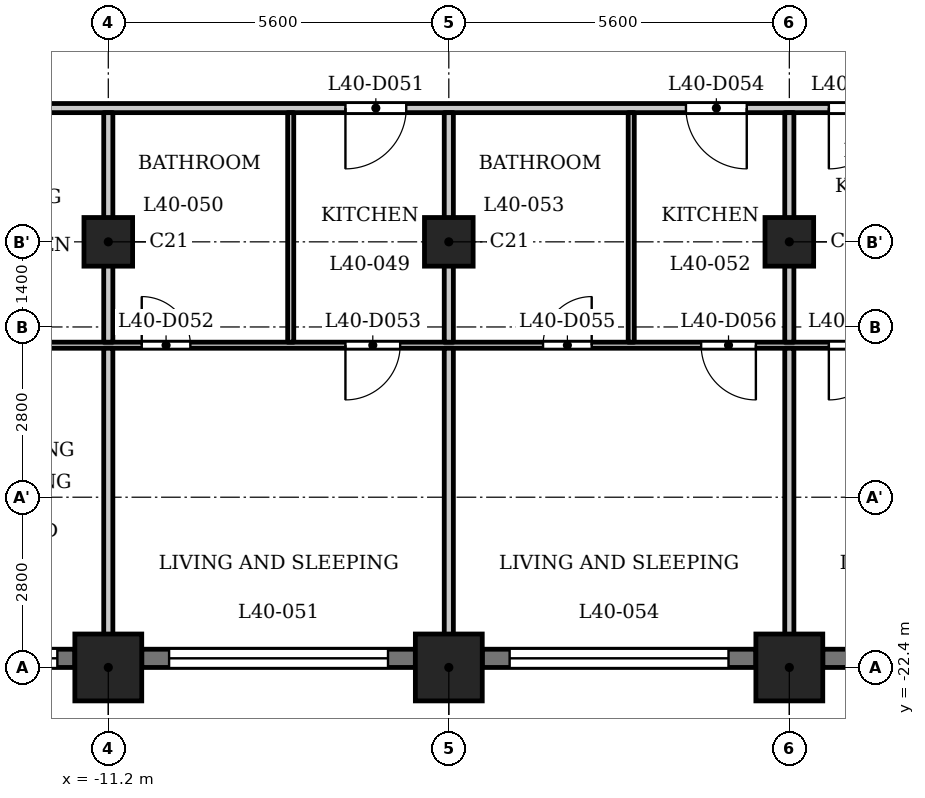
"""IFC4 building model, lengths in metres.
Left out: names, types, materials, properties, quantities, classifications, styles, units other than length and angle.
Written with IfcOpenShell. Run it as: python <this file> out.ifc"""

import sys

from ifc_helpers import new_model, si_unit, direction, frame, frame_2d, origin, origin_2d, place, context, subcontext, project, spatial, rectangle, extrude, element, fill, save


model = new_model("IFC4")
c1 = context("Model", 3, precision=1e-05, world=origin(), true_north=direction((0.0, 1.0)))
c2 = subcontext(c1, "Body", "Model", "MODEL_VIEW")
j1 = project(units=[si_unit("LENGTHUNIT", "METRE"), si_unit("PLANEANGLEUNIT", "RADIAN")], contexts=[c1])
p1 = place(None, origin())
s1 = spatial("IfcSite", under=j1, at=p1, CompositionType="ELEMENT")
p2 = place(p1, origin())
s2 = spatial("IfcBuilding", under=s1, at=p2, CompositionType="ELEMENT")
p3 = place(p2, frame((0.0, 0.0, 157.1)))
s3 = spatial("IfcBuildingStorey", under=s2, at=p3, CompositionType="ELEMENT", Elevation=157.1)
for number, where, z_axis, x_axis in (
    (1, (-11.2, -22.4, 0.0), (0.0, 0.0, 1.0), (1.0, 0.0, 0.0)),
    (2, (-5.6, -22.4, 0.0), (0.0, 0.0, 1.0), (1.0, 0.0, 0.0)),
    (3, (0.0, -22.4, 0.0), (0.0, 0.0, 1.0), (1.0, 0.0, 0.0)),
):
    element("IfcColumn", number, at=place(p3, frame(where, z_axis=z_axis, x_axis=x_axis)), inside=s3, PredefinedType="COLUMN", context=c2, shape_type="SweptSolid", body=[
        extrude(rectangle(XDim=1.1, YDim=1.1, at=origin_2d()), origin(), (0.0, 0.0, 1.0), 3.5),
    ])
for number, where, z_axis, x_axis in (
    (4, (-11.2, -15.4, 0.0), (0.0, 0.0, 1.0), (1.0, 0.0, 0.0)),
    (5, (-5.6, -15.4, 0.0), (0.0, 0.0, 1.0), (1.0, 0.0, 0.0)),
    (6, (0.0, -15.4, 0.0), (0.0, 0.0, 1.0), (1.0, 0.0, 0.0)),
):
    element("IfcColumn", number, at=place(p3, frame(where, z_axis=z_axis, x_axis=x_axis)), inside=s3, PredefinedType="COLUMN", context=c2, shape_type="SweptSolid", body=[
        extrude(rectangle(XDim=0.8, YDim=0.8, at=origin_2d()), origin(), (0.0, 0.0, 1.0), 3.5),
    ])
p4 = place(p3, frame((-16.25, -22.25, 0.0), z_axis=(0.0, 0.0, 1.0), x_axis=(1.0, 0.0, 0.0)))
e7 = element("IfcWall", 7, at=p4, inside=s3, PredefinedType="SOLIDWALL", context=c2, shape_type="SweptSolid", body=[
    extrude(rectangle(XDim=4.5, YDim=0.3, at=frame_2d((2.25, 0.0))), origin(), (0.0, 0.0, 1.0), 2.45),
])
p5 = place(p4, frame((0.387, 0.0, 0.6)))
e8 = element("IfcOpeningElement", 8, at=p5, cuts=e7, PredefinedType="OPENING", context=c2, shape_type="SweptSolid", body=[
    extrude(rectangle(XDim=1.2, YDim=1.55, at=frame_2d((0.6, 0.775))), frame((0.0, 0.16, 0.0), z_axis=(0.0, -1.0, 0.0), x_axis=(1.0, 0.0, 0.0)), (0.0, 0.0, 1.0), 0.32),
])
p6 = place(p4, frame((2.413, 0.0, 0.9)))
e9 = element("IfcOpeningElement", 9, at=p6, cuts=e7, PredefinedType="OPENING", context=c2, shape_type="SweptSolid", body=[
    extrude(rectangle(XDim=1.8, YDim=1.25, at=frame_2d((0.9, 0.625))), frame((0.0, 0.16, 0.0), z_axis=(0.0, -1.0, 0.0), x_axis=(1.0, 0.0, 0.0)), (0.0, 0.0, 1.0), 0.32),
])
p7 = place(p3, frame((-10.65, -22.25, 0.0), z_axis=(0.0, 0.0, 1.0), x_axis=(1.0, 0.0, 0.0)))
e10 = element("IfcWall", 10, at=p7, inside=s3, PredefinedType="SOLIDWALL", context=c2, shape_type="SweptSolid", body=[
    extrude(rectangle(XDim=4.5, YDim=0.3, at=frame_2d((2.25, 0.0))), origin(), (0.0, 0.0, 1.0), 2.45),
])
p8 = place(p7, frame((0.45, 0.0, 1.2)))
e11 = element("IfcOpeningElement", 11, at=p8, cuts=e10, PredefinedType="OPENING", context=c2, shape_type="SweptSolid", body=[
    extrude(rectangle(XDim=3.6, YDim=0.95, at=frame_2d((1.8, 0.475))), frame((0.0, 0.16, 0.0), z_axis=(0.0, -1.0, 0.0), x_axis=(1.0, 0.0, 0.0)), (0.0, 0.0, 1.0), 0.32),
])
p9 = place(p3, frame((-5.05, -22.25, 0.0), z_axis=(0.0, 0.0, 1.0), x_axis=(1.0, 0.0, 0.0)))
e12 = element("IfcWall", 12, at=p9, inside=s3, PredefinedType="SOLIDWALL", context=c2, shape_type="SweptSolid", body=[
    extrude(rectangle(XDim=4.5, YDim=0.3, at=frame_2d((2.25, 0.0))), origin(), (0.0, 0.0, 1.0), 2.45),
])
p10 = place(p9, frame((0.45, 0.0, 1.2)))
e13 = element("IfcOpeningElement", 13, at=p10, cuts=e12, PredefinedType="OPENING", context=c2, shape_type="SweptSolid", body=[
    extrude(rectangle(XDim=3.6, YDim=0.95, at=frame_2d((1.8, 0.475))), frame((0.0, 0.16, 0.0), z_axis=(0.0, -1.0, 0.0), x_axis=(1.0, 0.0, 0.0)), (0.0, 0.0, 1.0), 0.32),
])
p11 = place(p3, frame((0.55, -22.25, 0.0), z_axis=(0.0, 0.0, 1.0), x_axis=(1.0, 0.0, 0.0)))
e14 = element("IfcWall", 14, at=p11, inside=s3, PredefinedType="SOLIDWALL", context=c2, shape_type="SweptSolid", body=[
    extrude(rectangle(XDim=4.5, YDim=0.3, at=frame_2d((2.25, 0.0))), origin(), (0.0, 0.0, 1.0), 2.45),
])
p12 = place(p11, frame((0.45, 0.0, 1.2)))
e15 = element("IfcOpeningElement", 15, at=p12, cuts=e14, PredefinedType="OPENING", context=c2, shape_type="SweptSolid", body=[
    extrude(rectangle(XDim=3.6, YDim=0.95, at=frame_2d((1.8, 0.475))), frame((0.0, 0.16, 0.0), z_axis=(0.0, -1.0, 0.0), x_axis=(1.0, 0.0, 0.0)), (0.0, 0.0, 1.0), 0.32),
])
p13 = place(p3, frame((-16.725, -17.1, 0.0), z_axis=(0.0, 0.0, 1.0), x_axis=(1.0, 0.0, 0.0)))
e16 = element("IfcWall", 16, at=p13, inside=s3, PredefinedType="PARTITIONING", context=c2, shape_type="SweptSolid", body=[
    extrude(rectangle(XDim=33.45, YDim=0.1, at=frame_2d((16.725, 0.0))), origin(), (0.0, 0.0, 1.0), 3.2),
])
p14 = place(p13, frame((0.725, 0.0, 0.0)))
e17 = element("IfcOpeningElement", 17, at=p14, cuts=e16, PredefinedType="OPENING", context=c2, shape_type="SweptSolid", body=[
    extrude(rectangle(XDim=0.8, YDim=2.1, at=frame_2d((0.4, 1.05))), frame((0.0, 0.06, 0.0), z_axis=(0.0, -1.0, 0.0), x_axis=(1.0, 0.0, 0.0)), (0.0, 0.0, 1.0), 0.12),
])
p15 = place(p13, frame((3.175, 0.0, 0.0)))
e18 = element("IfcOpeningElement", 18, at=p15, cuts=e16, PredefinedType="OPENING", context=c2, shape_type="SweptSolid", body=[
    extrude(rectangle(XDim=0.9, YDim=2.1, at=frame_2d((0.45, 1.05))), frame((0.0, 0.06, 0.0), z_axis=(0.0, -1.0, 0.0), x_axis=(1.0, 0.0, 0.0)), (0.0, 0.0, 1.0), 0.12),
])
p16 = place(p13, frame((6.075, 0.0, 0.0)))
e19 = element("IfcOpeningElement", 19, at=p16, cuts=e16, PredefinedType="OPENING", context=c2, shape_type="SweptSolid", body=[
    extrude(rectangle(XDim=0.8, YDim=2.1, at=frame_2d((0.4, 1.05))), frame((0.0, 0.06, 0.0), z_axis=(0.0, -1.0, 0.0), x_axis=(1.0, 0.0, 0.0)), (0.0, 0.0, 1.0), 0.12),
])
p17 = place(p13, frame((9.425, 0.0, 0.0)))
e20 = element("IfcOpeningElement", 20, at=p17, cuts=e16, PredefinedType="OPENING", context=c2, shape_type="SweptSolid", body=[
    extrude(rectangle(XDim=0.9, YDim=2.1, at=frame_2d((0.45, 1.05))), frame((0.0, 0.06, 0.0), z_axis=(0.0, -1.0, 0.0), x_axis=(1.0, 0.0, 0.0)), (0.0, 0.0, 1.0), 0.12),
])
p18 = place(p13, frame((12.675, 0.0, 0.0)))
e21 = element("IfcOpeningElement", 21, at=p18, cuts=e16, PredefinedType="OPENING", context=c2, shape_type="SweptSolid", body=[
    extrude(rectangle(XDim=0.8, YDim=2.1, at=frame_2d((0.4, 1.05))), frame((0.0, 0.06, 0.0), z_axis=(0.0, -1.0, 0.0), x_axis=(1.0, 0.0, 0.0)), (0.0, 0.0, 1.0), 0.12),
])
p19 = place(p13, frame((15.275, 0.0, 0.0)))
e22 = element("IfcOpeningElement", 22, at=p19, cuts=e16, PredefinedType="OPENING", context=c2, shape_type="SweptSolid", body=[
    extrude(rectangle(XDim=0.9, YDim=2.1, at=frame_2d((0.45, 1.05))), frame((0.0, 0.06, 0.0), z_axis=(0.0, -1.0, 0.0), x_axis=(1.0, 0.0, 0.0)), (0.0, 0.0, 1.0), 0.12),
])
p20 = place(p13, frame((20.625, 0.0, 0.0)))
e23 = element("IfcOpeningElement", 23, at=p20, cuts=e16, PredefinedType="OPENING", context=c2, shape_type="SweptSolid", body=[
    extrude(rectangle(XDim=0.8, YDim=2.1, at=frame_2d((0.4, 1.05))), frame((0.0, 0.06, 0.0), z_axis=(0.0, -1.0, 0.0), x_axis=(1.0, 0.0, 0.0)), (0.0, 0.0, 1.0), 0.12),
])
p21 = place(p13, frame((17.375, 0.0, 0.0)))
e24 = element("IfcOpeningElement", 24, at=p21, cuts=e16, PredefinedType="OPENING", context=c2, shape_type="SweptSolid", body=[
    extrude(rectangle(XDim=0.9, YDim=2.1, at=frame_2d((0.45, 1.05))), frame((0.0, 0.06, 0.0), z_axis=(0.0, -1.0, 0.0), x_axis=(1.0, 0.0, 0.0)), (0.0, 0.0, 1.0), 0.12),
])
p22 = place(p13, frame((31.075, 0.0, 0.0)))
e25 = element("IfcOpeningElement", 25, at=p22, cuts=e16, PredefinedType="OPENING", context=c2, shape_type="SweptSolid", body=[
    extrude(rectangle(XDim=0.8, YDim=2.1, at=frame_2d((0.4, 1.05))), frame((0.0, 0.06, 0.0), z_axis=(0.0, -1.0, 0.0), x_axis=(1.0, 0.0, 0.0)), (0.0, 0.0, 1.0), 0.12),
])
p23 = place(p13, frame((29.325, 0.0, 0.0)))
e26 = element("IfcOpeningElement", 26, at=p23, cuts=e16, PredefinedType="OPENING", context=c2, shape_type="SweptSolid", body=[
    extrude(rectangle(XDim=0.9, YDim=2.1, at=frame_2d((0.45, 1.05))), frame((0.0, 0.06, 0.0), z_axis=(0.0, -1.0, 0.0), x_axis=(1.0, 0.0, 0.0)), (0.0, 0.0, 1.0), 0.12),
])
p24 = place(p13, frame((23.725, 0.0, 0.0)))
e27 = element("IfcOpeningElement", 27, at=p24, cuts=e16, PredefinedType="OPENING", context=c2, shape_type="SweptSolid", body=[
    extrude(rectangle(XDim=0.9, YDim=2.1, at=frame_2d((0.45, 1.05))), frame((0.0, 0.06, 0.0), z_axis=(0.0, -1.0, 0.0), x_axis=(1.0, 0.0, 0.0)), (0.0, 0.0, 1.0), 0.12),
])
p25 = place(p13, frame((25.775, 0.0, 0.0)))
e28 = element("IfcOpeningElement", 28, at=p25, cuts=e16, PredefinedType="OPENING", context=c2, shape_type="SweptSolid", body=[
    extrude(rectangle(XDim=0.9, YDim=2.1, at=frame_2d((0.45, 1.05))), frame((0.0, 0.06, 0.0), z_axis=(0.0, -1.0, 0.0), x_axis=(1.0, 0.0, 0.0)), (0.0, 0.0, 1.0), 0.12),
])
p26 = place(p3, frame((-17.4, -13.2, 0.0), z_axis=(0.0, 0.0, 1.0), x_axis=(1.0, 0.0, 0.0)))
e29 = element("IfcWall", 29, at=p26, inside=s3, PredefinedType="PARTITIONING", context=c2, shape_type="SweptSolid", body=[
    extrude(rectangle(XDim=34.8, YDim=0.15, at=frame_2d((17.4, 0.0))), origin(), (0.0, 0.0, 1.0), 3.2),
])
p27 = place(p26, frame((0.15, 0.0, 0.0)))
e30 = element("IfcOpeningElement", 30, at=p27, cuts=e29, PredefinedType="OPENING", context=c2, shape_type="SweptSolid", body=[
    extrude(rectangle(XDim=1.0, YDim=2.1, at=frame_2d((0.5, 1.05))), frame((0.0, 0.085, 0.0), z_axis=(0.0, -1.0, 0.0), x_axis=(1.0, 0.0, 0.0)), (0.0, 0.0, 1.0), 0.17),
])
p28 = place(p26, frame((33.55, 0.0, 0.0)))
e31 = element("IfcOpeningElement", 31, at=p28, cuts=e29, PredefinedType="OPENING", context=c2, shape_type="SweptSolid", body=[
    extrude(rectangle(XDim=1.0, YDim=2.1, at=frame_2d((0.5, 1.05))), frame((0.0, 0.085, 0.0), z_axis=(0.0, -1.0, 0.0), x_axis=(1.0, 0.0, 0.0)), (0.0, 0.0, 1.0), 0.17),
])
p29 = place(p26, frame((3.5, 0.0, 0.0)))
e32 = element("IfcOpeningElement", 32, at=p29, cuts=e29, PredefinedType="OPENING", context=c2, shape_type="SweptSolid", body=[
    extrude(rectangle(XDim=1.0, YDim=2.1, at=frame_2d((0.5, 1.05))), frame((0.0, 0.085, 0.0), z_axis=(0.0, -1.0, 0.0), x_axis=(1.0, 0.0, 0.0)), (0.0, 0.0, 1.0), 0.17),
])
p30 = place(p26, frame((10.1, 0.0, 0.0)))
e33 = element("IfcOpeningElement", 33, at=p30, cuts=e29, PredefinedType="OPENING", context=c2, shape_type="SweptSolid", body=[
    extrude(rectangle(XDim=1.0, YDim=2.1, at=frame_2d((0.5, 1.05))), frame((0.0, 0.085, 0.0), z_axis=(0.0, -1.0, 0.0), x_axis=(1.0, 0.0, 0.0)), (0.0, 0.0, 1.0), 0.17),
])
p31 = place(p26, frame((15.7, 0.0, 0.0)))
e34 = element("IfcOpeningElement", 34, at=p31, cuts=e29, PredefinedType="OPENING", context=c2, shape_type="SweptSolid", body=[
    extrude(rectangle(XDim=1.0, YDim=2.1, at=frame_2d((0.5, 1.05))), frame((0.0, 0.085, 0.0), z_axis=(0.0, -1.0, 0.0), x_axis=(1.0, 0.0, 0.0)), (0.0, 0.0, 1.0), 0.17),
])
p32 = place(p26, frame((18.05, 0.0, 0.0)))
e35 = element("IfcOpeningElement", 35, at=p32, cuts=e29, PredefinedType="OPENING", context=c2, shape_type="SweptSolid", body=[
    extrude(rectangle(XDim=1.0, YDim=2.1, at=frame_2d((0.5, 1.05))), frame((0.0, 0.085, 0.0), z_axis=(0.0, -1.0, 0.0), x_axis=(1.0, 0.0, 0.0)), (0.0, 0.0, 1.0), 0.17),
])
p33 = place(p26, frame((26.9, 0.0, 0.0)))
e36 = element("IfcOpeningElement", 36, at=p33, cuts=e29, PredefinedType="OPENING", context=c2, shape_type="SweptSolid", body=[
    extrude(rectangle(XDim=1.0, YDim=2.1, at=frame_2d((0.5, 1.05))), frame((0.0, 0.085, 0.0), z_axis=(0.0, -1.0, 0.0), x_axis=(1.0, 0.0, 0.0)), (0.0, 0.0, 1.0), 0.17),
])
p34 = place(p3, frame((-11.2, -22.93, 0.0), z_axis=(0.0, 0.0, 1.0), x_axis=(0.0, 1.0, 0.0)))
e37 = element("IfcWall", 37, at=p34, inside=s3, PredefinedType="PARTITIONING", context=c2, shape_type="SweptSolid", body=[
    extrude(rectangle(XDim=5.78, YDim=0.15, at=frame_2d((2.89, 0.0))), origin(), (0.0, 0.0, 1.0), 3.2),
])
p35 = place(p3, frame((-11.2, -17.05, 0.0), z_axis=(0.0, 0.0, 1.0), x_axis=(0.0, 1.0, 0.0)))
e38 = element("IfcWall", 38, at=p35, inside=s3, PredefinedType="PARTITIONING", context=c2, shape_type="SweptSolid", body=[
    extrude(rectangle(XDim=3.775, YDim=0.15, at=frame_2d((1.888, 0.0))), origin(), (0.0, 0.0, 1.0), 3.2),
])
p36 = place(p3, frame((-8.2, -17.05, 0.0), z_axis=(0.0, 0.0, 1.0), x_axis=(0.0, 1.0, 0.0)))
e39 = element("IfcWall", 39, at=p36, inside=s3, PredefinedType="PARTITIONING", context=c2, shape_type="SweptSolid", body=[
    extrude(rectangle(XDim=3.775, YDim=0.1, at=frame_2d((1.888, 0.0))), origin(), (0.0, 0.0, 1.0), 3.2),
])
p37 = place(p3, frame((-5.6, -22.93, 0.0), z_axis=(0.0, 0.0, 1.0), x_axis=(0.0, 1.0, 0.0)))
e40 = element("IfcWall", 40, at=p37, inside=s3, PredefinedType="PARTITIONING", context=c2, shape_type="SweptSolid", body=[
    extrude(rectangle(XDim=5.78, YDim=0.15, at=frame_2d((2.89, 0.0))), origin(), (0.0, 0.0, 1.0), 3.2),
])
p38 = place(p3, frame((-5.6, -17.05, 0.0), z_axis=(0.0, 0.0, 1.0), x_axis=(0.0, 1.0, 0.0)))
e41 = element("IfcWall", 41, at=p38, inside=s3, PredefinedType="PARTITIONING", context=c2, shape_type="SweptSolid", body=[
    extrude(rectangle(XDim=3.775, YDim=0.15, at=frame_2d((1.888, 0.0))), origin(), (0.0, 0.0, 1.0), 3.2),
])
p39 = place(p3, frame((-2.6, -17.05, 0.0), z_axis=(0.0, 0.0, 1.0), x_axis=(0.0, 1.0, 0.0)))
e42 = element("IfcWall", 42, at=p39, inside=s3, PredefinedType="PARTITIONING", context=c2, shape_type="SweptSolid", body=[
    extrude(rectangle(XDim=3.775, YDim=0.1, at=frame_2d((1.888, 0.0))), origin(), (0.0, 0.0, 1.0), 3.2),
])
p40 = place(p3, frame((0.0, -22.93, 0.0), z_axis=(0.0, 0.0, 1.0), x_axis=(0.0, 1.0, 0.0)))
e43 = element("IfcWall", 43, at=p40, inside=s3, PredefinedType="PARTITIONING", context=c2, shape_type="SweptSolid", body=[
    extrude(rectangle(XDim=5.78, YDim=0.15, at=frame_2d((2.89, 0.0))), origin(), (0.0, 0.0, 1.0), 3.2),
])
p41 = place(p3, frame((0.0, -17.05, 0.0), z_axis=(0.0, 0.0, 1.0), x_axis=(0.0, 1.0, 0.0)))
e44 = element("IfcWall", 44, at=p41, inside=s3, PredefinedType="PARTITIONING", context=c2, shape_type="SweptSolid", body=[
    extrude(rectangle(XDim=3.775, YDim=0.15, at=frame_2d((1.888, 0.0))), origin(), (0.0, 0.0, 1.0), 3.2),
])
p42 = place(p30, origin())
e45 = element("IfcDoor", 45, at=p42, inside=s3, OperationType="SINGLE_SWING_LEFT", PredefinedType="DOOR", context=c2, shape_type="SweptSolid", body=[
    extrude(rectangle(XDim=1.0, YDim=2.1, at=frame_2d((0.5, 1.05))), frame((0.0, 0.025, 0.0), z_axis=(0.0, -1.0, 0.0), x_axis=(1.0, 0.0, 0.0)), (0.0, 0.0, 1.0), 0.05),
])
fill(e33, e45)
p43 = place(p16, origin())
e46 = element("IfcDoor", 46, at=p43, inside=s3, OperationType="SINGLE_SWING_RIGHT", PredefinedType="DOOR", context=c2, shape_type="SweptSolid", body=[
    extrude(rectangle(XDim=0.8, YDim=2.1, at=frame_2d((0.4, 1.05))), frame((0.0, 0.025, 0.0), z_axis=(0.0, -1.0, 0.0), x_axis=(1.0, 0.0, 0.0)), (0.0, 0.0, 1.0), 0.05),
])
fill(e19, e46)
p44 = place(p17, origin())
e47 = element("IfcDoor", 47, at=p44, inside=s3, OperationType="SINGLE_SWING_LEFT", PredefinedType="DOOR", context=c2, shape_type="SweptSolid", body=[
    extrude(rectangle(XDim=0.9, YDim=2.1, at=frame_2d((0.45, 1.05))), frame((0.0, 0.025, 0.0), z_axis=(0.0, -1.0, 0.0), x_axis=(1.0, 0.0, 0.0)), (0.0, 0.0, 1.0), 0.05),
])
fill(e20, e47)
p45 = place(p31, origin())
e48 = element("IfcDoor", 48, at=p45, inside=s3, OperationType="SINGLE_SWING_RIGHT", PredefinedType="DOOR", context=c2, shape_type="SweptSolid", body=[
    extrude(rectangle(XDim=1.0, YDim=2.1, at=frame_2d((0.5, 1.05))), frame((0.0, 0.025, 0.0), z_axis=(0.0, -1.0, 0.0), x_axis=(1.0, 0.0, 0.0)), (0.0, 0.0, 1.0), 0.05),
])
fill(e34, e48)
p46 = place(p18, origin())
e49 = element("IfcDoor", 49, at=p46, inside=s3, OperationType="SINGLE_SWING_LEFT", PredefinedType="DOOR", context=c2, shape_type="SweptSolid", body=[
    extrude(rectangle(XDim=0.8, YDim=2.1, at=frame_2d((0.4, 1.05))), frame((0.0, 0.025, 0.0), z_axis=(0.0, -1.0, 0.0), x_axis=(1.0, 0.0, 0.0)), (0.0, 0.0, 1.0), 0.05),
])
fill(e21, e49)
p47 = place(p19, origin())
e50 = element("IfcDoor", 50, at=p47, inside=s3, OperationType="SINGLE_SWING_RIGHT", PredefinedType="DOOR", context=c2, shape_type="SweptSolid", body=[
    extrude(rectangle(XDim=0.9, YDim=2.1, at=frame_2d((0.45, 1.05))), frame((0.0, 0.025, 0.0), z_axis=(0.0, -1.0, 0.0), x_axis=(1.0, 0.0, 0.0)), (0.0, 0.0, 1.0), 0.05),
])
fill(e22, e50)
p48 = place(p32, origin())
e51 = element("IfcDoor", 51, at=p48, inside=s3, OperationType="SINGLE_SWING_LEFT", PredefinedType="DOOR", context=c2, shape_type="SweptSolid", body=[
    extrude(rectangle(XDim=1.0, YDim=2.1, at=frame_2d((0.5, 1.05))), frame((0.0, 0.025, 0.0), z_axis=(0.0, -1.0, 0.0), x_axis=(1.0, 0.0, 0.0)), (0.0, 0.0, 1.0), 0.05),
])
fill(e35, e51)
p49 = place(p21, origin())
e52 = element("IfcDoor", 52, at=p49, inside=s3, OperationType="SINGLE_SWING_LEFT", PredefinedType="DOOR", context=c2, shape_type="SweptSolid", body=[
    extrude(rectangle(XDim=0.9, YDim=2.1, at=frame_2d((0.45, 1.05))), frame((0.0, 0.025, 0.0), z_axis=(0.0, -1.0, 0.0), x_axis=(1.0, 0.0, 0.0)), (0.0, 0.0, 1.0), 0.05),
])
fill(e24, e52)
p50 = place(p6, origin())
e53 = element("IfcWindow", 53, at=p50, inside=s3, PartitioningType="SINGLE_PANEL", PredefinedType="WINDOW", context=c2, shape_type="SweptSolid", body=[
    extrude(rectangle(XDim=1.8, YDim=1.25, at=frame_2d((0.9, 0.625))), frame((0.0, 0.03, 0.0), z_axis=(0.0, -1.0, 0.0), x_axis=(1.0, 0.0, 0.0)), (0.0, 0.0, 1.0), 0.06),
])
fill(e9, e53)
p51 = place(p8, origin())
e54 = element("IfcWindow", 54, at=p51, inside=s3, PartitioningType="SINGLE_PANEL", PredefinedType="WINDOW", context=c2, shape_type="SweptSolid", body=[
    extrude(rectangle(XDim=3.6, YDim=0.95, at=frame_2d((1.8, 0.475))), frame((0.0, 0.03, 0.0), z_axis=(0.0, -1.0, 0.0), x_axis=(1.0, 0.0, 0.0)), (0.0, 0.0, 1.0), 0.06),
])
fill(e11, e54)
p52 = place(p10, origin())
e55 = element("IfcWindow", 55, at=p52, inside=s3, PartitioningType="SINGLE_PANEL", PredefinedType="WINDOW", context=c2, shape_type="SweptSolid", body=[
    extrude(rectangle(XDim=3.6, YDim=0.95, at=frame_2d((1.8, 0.475))), frame((0.0, 0.03, 0.0), z_axis=(0.0, -1.0, 0.0), x_axis=(1.0, 0.0, 0.0)), (0.0, 0.0, 1.0), 0.06),
])
fill(e13, e55)
save(model, sys.argv[1])
